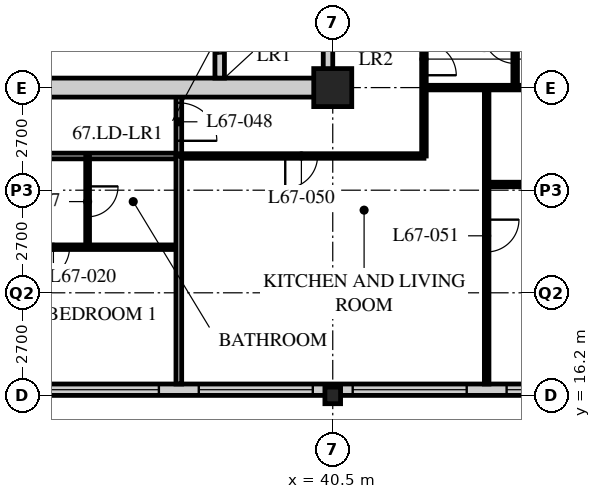
"""IFC4 building model, lengths in metres.
Left out: names, types, materials, properties, quantities, classifications, styles, units other than length and angle.
Written with IfcOpenShell. Run it as: python <this file> out.ifc"""

import sys

from ifc_helpers import new_model, si_unit, direction, frame, frame_2d, origin, origin_2d, place, context, subcontext, project, spatial, rectangle, hollow_rectangle, i_section, extrude, element, fill, save


model = new_model("IFC4")
c1 = context("Model", 3, precision=1e-05, world=origin(), true_north=direction((0.0, 1.0)))
c2 = subcontext(c1, "Body", "Model", "MODEL_VIEW")
j1 = project(units=[si_unit("LENGTHUNIT", "METRE"), si_unit("PLANEANGLEUNIT", "RADIAN")], contexts=[c1])
p1 = place(None, origin())
s1 = spatial("IfcSite", under=j1, at=p1, CompositionType="ELEMENT")
p2 = place(p1, origin())
s2 = spatial("IfcBuilding", under=s1, at=p2, CompositionType="ELEMENT")
p3 = place(p2, frame((0.0, 0.0, 261.9)))
s3 = spatial("IfcBuildingStorey", under=s2, at=p3, CompositionType="ELEMENT", Elevation=261.9)
p4 = place(p3, frame((40.5, 16.2, 0.0), z_axis=(0.0, 0.0, 1.0), x_axis=(1.0, 0.0, 0.0)))
e1 = element("IfcColumn", 1, at=p4, inside=s3, PredefinedType="COLUMN", context=c2, shape_type="SweptSolid", body=[
    extrude(i_section(OverallWidth=0.412, OverallDepth=0.437, WebThickness=0.036, FlangeThickness=0.058, FilletRadius=0.015, at=origin_2d()), origin(), (0.0, 0.0, 1.0), 3.9),
])
p5 = place(p3, frame((40.5, 24.3, 0.0), z_axis=(0.0, 0.0, 1.0), x_axis=(1.0, 0.0, 0.0)))
e2 = element("IfcColumn", 2, at=p5, inside=s3, PredefinedType="COLUMN", context=c2, shape_type="SweptSolid", body=[
    extrude(hollow_rectangle(XDim=1.0, YDim=1.0, WallThickness=0.1, at=origin_2d()), origin(), (0.0, 0.0, 1.0), 3.9),
])
p6 = place(p3, frame((8.4, 16.35, 0.0), z_axis=(0.0, 0.0, 1.0), x_axis=(1.0, 0.0, 0.0)))
e3 = element("IfcWall", 3, at=p6, inside=s3, PredefinedType="SOLIDWALL", context=c2, shape_type="SweptSolid", body=[
    extrude(rectangle(XDim=40.2, YDim=0.3, at=frame_2d((20.1, 0.0))), origin(), (0.0, 0.0, 1.0), 3.69),
])
p7 = place(p6, frame((0.225, 0.0, 0.6)))
e4 = element("IfcOpeningElement", 4, at=p7, cuts=e3, PredefinedType="OPENING", context=c2, shape_type="SweptSolid", body=[
    extrude(rectangle(XDim=3.0, YDim=2.4, at=frame_2d((1.5, 1.2))), frame((0.0, 0.16, 0.0), z_axis=(0.0, -1.0, 0.0), x_axis=(1.0, 0.0, 0.0)), (0.0, 0.0, 1.0), 0.32),
])
p8 = place(p6, frame((4.275, 0.0, 0.6)))
e5 = element("IfcOpeningElement", 5, at=p8, cuts=e3, PredefinedType="OPENING", context=c2, shape_type="SweptSolid", body=[
    extrude(rectangle(XDim=3.0, YDim=2.4, at=frame_2d((1.5, 1.2))), frame((0.0, 0.16, 0.0), z_axis=(0.0, -1.0, 0.0), x_axis=(1.0, 0.0, 0.0)), (0.0, 0.0, 1.0), 0.32),
])
p9 = place(p6, frame((8.325, 0.0, 0.6)))
e6 = element("IfcOpeningElement", 6, at=p9, cuts=e3, PredefinedType="OPENING", context=c2, shape_type="SweptSolid", body=[
    extrude(rectangle(XDim=3.0, YDim=2.4, at=frame_2d((1.5, 1.2))), frame((0.0, 0.16, 0.0), z_axis=(0.0, -1.0, 0.0), x_axis=(1.0, 0.0, 0.0)), (0.0, 0.0, 1.0), 0.32),
])
p10 = place(p6, frame((12.375, 0.0, 0.6)))
e7 = element("IfcOpeningElement", 7, at=p10, cuts=e3, PredefinedType="OPENING", context=c2, shape_type="SweptSolid", body=[
    extrude(rectangle(XDim=3.0, YDim=2.4, at=frame_2d((1.5, 1.2))), frame((0.0, 0.16, 0.0), z_axis=(0.0, -1.0, 0.0), x_axis=(1.0, 0.0, 0.0)), (0.0, 0.0, 1.0), 0.32),
])
p11 = place(p6, frame((16.425, 0.0, 0.6)))
e8 = element("IfcOpeningElement", 8, at=p11, cuts=e3, PredefinedType="OPENING", context=c2, shape_type="SweptSolid", body=[
    extrude(rectangle(XDim=3.0, YDim=2.4, at=frame_2d((1.5, 1.2))), frame((0.0, 0.16, 0.0), z_axis=(0.0, -1.0, 0.0), x_axis=(1.0, 0.0, 0.0)), (0.0, 0.0, 1.0), 0.32),
])
p12 = place(p6, frame((20.475, 0.0, 0.6)))
e9 = element("IfcOpeningElement", 9, at=p12, cuts=e3, PredefinedType="OPENING", context=c2, shape_type="SweptSolid", body=[
    extrude(rectangle(XDim=3.0, YDim=2.4, at=frame_2d((1.5, 1.2))), frame((0.0, 0.16, 0.0), z_axis=(0.0, -1.0, 0.0), x_axis=(1.0, 0.0, 0.0)), (0.0, 0.0, 1.0), 0.32),
])
p13 = place(p6, frame((24.525, 0.0, 0.6)))
e10 = element("IfcOpeningElement", 10, at=p13, cuts=e3, PredefinedType="OPENING", context=c2, shape_type="SweptSolid", body=[
    extrude(rectangle(XDim=3.0, YDim=2.4, at=frame_2d((1.5, 1.2))), frame((0.0, 0.16, 0.0), z_axis=(0.0, -1.0, 0.0), x_axis=(1.0, 0.0, 0.0)), (0.0, 0.0, 1.0), 0.32),
])
p14 = place(p6, frame((28.575, 0.0, 0.6)))
e11 = element("IfcOpeningElement", 11, at=p14, cuts=e3, PredefinedType="OPENING", context=c2, shape_type="SweptSolid", body=[
    extrude(rectangle(XDim=3.0, YDim=2.4, at=frame_2d((1.5, 1.2))), frame((0.0, 0.16, 0.0), z_axis=(0.0, -1.0, 0.0), x_axis=(1.0, 0.0, 0.0)), (0.0, 0.0, 1.0), 0.32),
])
p15 = place(p6, frame((32.625, 0.0, 0.6)))
e12 = element("IfcOpeningElement", 12, at=p15, cuts=e3, PredefinedType="OPENING", context=c2, shape_type="SweptSolid", body=[
    extrude(rectangle(XDim=3.0, YDim=2.4, at=frame_2d((1.5, 1.2))), frame((0.0, 0.16, 0.0), z_axis=(0.0, -1.0, 0.0), x_axis=(1.0, 0.0, 0.0)), (0.0, 0.0, 1.0), 0.32),
])
p16 = place(p6, frame((36.675, 0.0, 0.6)))
e13 = element("IfcOpeningElement", 13, at=p16, cuts=e3, PredefinedType="OPENING", context=c2, shape_type="SweptSolid", body=[
    extrude(rectangle(XDim=3.0, YDim=2.4, at=frame_2d((1.5, 1.2))), frame((0.0, 0.16, 0.0), z_axis=(0.0, -1.0, 0.0), x_axis=(1.0, 0.0, 0.0)), (0.0, 0.0, 1.0), 0.32),
])
p17 = place(p3, frame((8.1, 22.5, 0.0), z_axis=(0.0, 0.0, 1.0), x_axis=(1.0, 0.0, 0.0)))
e14 = element("IfcWall", 14, at=p17, inside=s3, PredefinedType="PARTITIONING", context=c2, shape_type="SweptSolid", body=[
    extrude(rectangle(XDim=28.35, YDim=0.15, at=frame_2d((14.175, 0.0))), origin(), (0.0, 0.0, 1.0), 3.69),
])
p18 = place(p17, frame((4.45, 0.0, 0.0)))
e15 = element("IfcOpeningElement", 15, at=p18, cuts=e14, PredefinedType="OPENING", context=c2, shape_type="SweptSolid", body=[
    extrude(rectangle(XDim=1.0, YDim=2.1, at=frame_2d((0.5, 1.05))), frame((0.0, 0.085, 0.0), z_axis=(0.0, -1.0, 0.0), x_axis=(1.0, 0.0, 0.0)), (0.0, 0.0, 1.0), 0.17),
])
p19 = place(p17, frame((12.55, 0.0, 0.0)))
e16 = element("IfcOpeningElement", 16, at=p19, cuts=e14, PredefinedType="OPENING", context=c2, shape_type="SweptSolid", body=[
    extrude(rectangle(XDim=1.0, YDim=2.1, at=frame_2d((0.5, 1.05))), frame((0.0, 0.085, 0.0), z_axis=(0.0, -1.0, 0.0), x_axis=(1.0, 0.0, 0.0)), (0.0, 0.0, 1.0), 0.17),
])
p20 = place(p17, frame((20.65, 0.0, 0.0)))
e17 = element("IfcOpeningElement", 17, at=p20, cuts=e14, PredefinedType="OPENING", context=c2, shape_type="SweptSolid", body=[
    extrude(rectangle(XDim=1.0, YDim=2.1, at=frame_2d((0.5, 1.05))), frame((0.0, 0.085, 0.0), z_axis=(0.0, -1.0, 0.0), x_axis=(1.0, 0.0, 0.0)), (0.0, 0.0, 1.0), 0.17),
])
p21 = place(p17, frame((2.625, 0.0, 0.0)))
e18 = element("IfcOpeningElement", 18, at=p21, cuts=e14, PredefinedType="OPENING", context=c2, shape_type="SweptSolid", body=[
    extrude(rectangle(XDim=1.0, YDim=2.1, at=frame_2d((0.5, 1.05))), frame((0.0, 0.085, 0.0), z_axis=(0.0, -1.0, 0.0), x_axis=(1.0, 0.0, 0.0)), (0.0, 0.0, 1.0), 0.17),
])
p22 = place(p3, frame((36.45, 22.5, 0.0), z_axis=(0.0, 0.0, 1.0), x_axis=(0.0, 1.0, 0.0)))
e19 = element("IfcWall", 19, at=p22, inside=s3, PredefinedType="PARTITIONING", context=c2, shape_type="SweptSolid", body=[
    extrude(rectangle(XDim=1.8, YDim=0.15, at=frame_2d((0.9, 0.0))), origin(), (0.0, 0.0, 1.0), 3.69),
])
p23 = place(p22, frame((0.4, 0.0, 0.0)))
e20 = element("IfcOpeningElement", 20, at=p23, cuts=e19, PredefinedType="OPENING", context=c2, shape_type="SweptSolid", body=[
    extrude(rectangle(XDim=1.0, YDim=2.1, at=frame_2d((0.5, 1.05))), frame((0.0, 0.085, 0.0), z_axis=(0.0, -1.0, 0.0), x_axis=(1.0, 0.0, 0.0)), (0.0, 0.0, 1.0), 0.17),
])
p24 = place(p3, frame((34.05, 22.5, 0.0), z_axis=(0.0, 0.0, 1.0), x_axis=(0.0, -1.0, 0.0)))
e21 = element("IfcWall", 21, at=p24, inside=s3, PredefinedType="PARTITIONING", context=c2, shape_type="SweptSolid", body=[
    extrude(rectangle(XDim=2.4, YDim=0.1, at=frame_2d((1.2, 0.0))), origin(), (0.0, 0.0, 1.0), 3.69),
])
p25 = place(p24, frame((0.8, 0.0, 0.0)))
e22 = element("IfcOpeningElement", 22, at=p25, cuts=e21, PredefinedType="OPENING", context=c2, shape_type="SweptSolid", body=[
    extrude(rectangle(XDim=0.8, YDim=2.1, at=frame_2d((0.4, 1.05))), frame((0.0, 0.06, 0.0), z_axis=(0.0, -1.0, 0.0), x_axis=(1.0, 0.0, 0.0)), (0.0, 0.0, 1.0), 0.12),
])
p26 = place(p3, frame((8.1, 20.1, 0.0), z_axis=(0.0, 0.0, 1.0), x_axis=(1.0, 0.0, 0.0)))
e23 = element("IfcWall", 23, at=p26, inside=s3, PredefinedType="PARTITIONING", context=c2, shape_type="SweptSolid", body=[
    extrude(rectangle(XDim=28.35, YDim=0.12, at=frame_2d((14.175, 0.0))), origin(), (0.0, 0.0, 1.0), 3.69),
])
p27 = place(p26, frame((5.025, 0.0, 0.0)))
e24 = element("IfcOpeningElement", 24, at=p27, cuts=e23, PredefinedType="OPENING", context=c2, shape_type="SweptSolid", body=[
    extrude(rectangle(XDim=0.85, YDim=2.1, at=frame_2d((0.425, 1.05))), frame((0.0, 0.07, 0.0), z_axis=(0.0, -1.0, 0.0), x_axis=(1.0, 0.0, 0.0)), (0.0, 0.0, 1.0), 0.14),
])
p28 = place(p26, frame((8.425, 0.0, 0.0)))
e25 = element("IfcOpeningElement", 25, at=p28, cuts=e23, PredefinedType="OPENING", context=c2, shape_type="SweptSolid", body=[
    extrude(rectangle(XDim=0.85, YDim=2.1, at=frame_2d((0.425, 1.05))), frame((0.0, 0.07, 0.0), z_axis=(0.0, -1.0, 0.0), x_axis=(1.0, 0.0, 0.0)), (0.0, 0.0, 1.0), 0.14),
])
p29 = place(p26, frame((13.125, 0.0, 0.0)))
e26 = element("IfcOpeningElement", 26, at=p29, cuts=e23, PredefinedType="OPENING", context=c2, shape_type="SweptSolid", body=[
    extrude(rectangle(XDim=0.85, YDim=2.1, at=frame_2d((0.425, 1.05))), frame((0.0, 0.07, 0.0), z_axis=(0.0, -1.0, 0.0), x_axis=(1.0, 0.0, 0.0)), (0.0, 0.0, 1.0), 0.14),
])
p30 = place(p26, frame((16.525, 0.0, 0.0)))
e27 = element("IfcOpeningElement", 27, at=p30, cuts=e23, PredefinedType="OPENING", context=c2, shape_type="SweptSolid", body=[
    extrude(rectangle(XDim=0.85, YDim=2.1, at=frame_2d((0.425, 1.05))), frame((0.0, 0.07, 0.0), z_axis=(0.0, -1.0, 0.0), x_axis=(1.0, 0.0, 0.0)), (0.0, 0.0, 1.0), 0.14),
])
p31 = place(p26, frame((21.225, 0.0, 0.0)))
e28 = element("IfcOpeningElement", 28, at=p31, cuts=e23, PredefinedType="OPENING", context=c2, shape_type="SweptSolid", body=[
    extrude(rectangle(XDim=0.85, YDim=2.1, at=frame_2d((0.425, 1.05))), frame((0.0, 0.07, 0.0), z_axis=(0.0, -1.0, 0.0), x_axis=(1.0, 0.0, 0.0)), (0.0, 0.0, 1.0), 0.14),
])
p32 = place(p26, frame((24.625, 0.0, 0.0)))
e29 = element("IfcOpeningElement", 29, at=p32, cuts=e23, PredefinedType="OPENING", context=c2, shape_type="SweptSolid", body=[
    extrude(rectangle(XDim=0.85, YDim=2.1, at=frame_2d((0.425, 1.05))), frame((0.0, 0.07, 0.0), z_axis=(0.0, -1.0, 0.0), x_axis=(1.0, 0.0, 0.0)), (0.0, 0.0, 1.0), 0.14),
])
p33 = place(p26, frame((2.725, 0.0, 0.0)))
e30 = element("IfcOpeningElement", 30, at=p33, cuts=e23, PredefinedType="OPENING", context=c2, shape_type="SweptSolid", body=[
    extrude(rectangle(XDim=0.85, YDim=2.1, at=frame_2d((0.425, 1.05))), frame((0.0, 0.07, 0.0), z_axis=(0.0, -1.0, 0.0), x_axis=(1.0, 0.0, 0.0)), (0.0, 0.0, 1.0), 0.14),
])
p34 = place(p3, frame((42.9, 22.5, 0.0), z_axis=(0.0, 0.0, 1.0), x_axis=(0.0, 1.0, 0.0)))
e31 = element("IfcWall", 31, at=p34, inside=s3, PredefinedType="PARTITIONING", context=c2, shape_type="SweptSolid", body=[
    extrude(rectangle(XDim=9.9, YDim=0.12, at=frame_2d((4.95, 0.0))), origin(), (0.0, 0.0, 1.0), 3.69),
])
p35 = place(p34, frame((2.125, 0.0, 0.0)))
e32 = element("IfcOpeningElement", 32, at=p35, cuts=e31, PredefinedType="OPENING", context=c2, shape_type="SweptSolid", body=[
    extrude(rectangle(XDim=0.85, YDim=2.1, at=frame_2d((0.425, 1.05))), frame((0.0, 0.07, 0.0), z_axis=(0.0, -1.0, 0.0), x_axis=(1.0, 0.0, 0.0)), (0.0, 0.0, 1.0), 0.14),
])
p36 = place(p34, frame((6.175, 0.0, 0.0)))
e33 = element("IfcOpeningElement", 33, at=p36, cuts=e31, PredefinedType="OPENING", context=c2, shape_type="SweptSolid", body=[
    extrude(rectangle(XDim=0.85, YDim=2.1, at=frame_2d((0.425, 1.05))), frame((0.0, 0.07, 0.0), z_axis=(0.0, -1.0, 0.0), x_axis=(1.0, 0.0, 0.0)), (0.0, 0.0, 1.0), 0.14),
])
p37 = place(p3, frame((36.45, 22.5, 0.0), z_axis=(0.0, 0.0, 1.0), x_axis=(1.0, 0.0, 0.0)))
e34 = element("IfcWall", 34, at=p37, inside=s3, PredefinedType="PARTITIONING", context=c2, shape_type="SweptSolid", body=[
    extrude(rectangle(XDim=6.45, YDim=0.12, at=frame_2d((3.225, 0.0))), origin(), (0.0, 0.0, 1.0), 3.69),
])
p38 = place(p37, frame((2.8, 0.0, 0.0)))
e35 = element("IfcOpeningElement", 35, at=p38, cuts=e34, PredefinedType="OPENING", context=c2, shape_type="SweptSolid", body=[
    extrude(rectangle(XDim=0.85, YDim=2.1, at=frame_2d((0.425, 1.05))), frame((0.0, 0.07, 0.0), z_axis=(0.0, -1.0, 0.0), x_axis=(1.0, 0.0, 0.0)), (0.0, 0.0, 1.0), 0.14),
])
p39 = place(p3, frame((42.9, 24.3, 0.0), z_axis=(0.0, 0.0, 1.0), x_axis=(1.0, 0.0, 0.0)))
e36 = element("IfcWall", 36, at=p39, inside=s3, PredefinedType="PARTITIONING", context=c2, shape_type="SweptSolid", body=[
    extrude(rectangle(XDim=9.45, YDim=0.12, at=frame_2d((4.725, 0.0))), origin(), (0.0, 0.0, 1.0), 3.078),
])
p40 = place(p3, frame((36.45, 16.5, 0.0), z_axis=(0.0, 0.0, 1.0), x_axis=(0.0, 1.0, 0.0)))
e37 = element("IfcWall", 37, at=p40, inside=s3, PredefinedType="PARTITIONING", context=c2, shape_type="SweptSolid", body=[
    extrude(rectangle(XDim=6.0, YDim=0.15, at=frame_2d((3.0, 0.0))), origin(), (0.0, 0.0, 1.0), 3.69),
])
p41 = place(p3, frame((44.55, 16.5, 0.0), z_axis=(0.0, 0.0, 1.0), x_axis=(0.0, 1.0, 0.0)))
e38 = element("IfcWall", 38, at=p41, inside=s3, PredefinedType="PARTITIONING", context=c2, shape_type="SweptSolid", body=[
    extrude(rectangle(XDim=7.8, YDim=0.12, at=frame_2d((3.9, 0.0))), origin(), (0.0, 0.0, 1.0), 3.69),
])
p42 = place(p41, frame((3.475, 0.0, 0.0)))
e39 = element("IfcOpeningElement", 39, at=p42, cuts=e38, PredefinedType="OPENING", context=c2, shape_type="SweptSolid", body=[
    extrude(rectangle(XDim=0.85, YDim=2.1, at=frame_2d((0.425, 1.05))), frame((0.0, 0.07, 0.0), z_axis=(0.0, -1.0, 0.0), x_axis=(1.0, 0.0, 0.0)), (0.0, 0.0, 1.0), 0.14),
])
p43 = place(p3, frame((45.3, 24.3, 0.0), z_axis=(0.0, 0.0, 1.0), x_axis=(0.0, 1.0, 0.0)))
e40 = element("IfcWall", 40, at=p43, inside=s3, PredefinedType="PARTITIONING", context=c2, shape_type="SweptSolid", body=[
    extrude(rectangle(XDim=1.76, YDim=0.12, at=frame_2d((0.88, 0.0))), origin(), (0.0, 0.0, 1.0), 3.69),
])
p44 = place(p43, frame((0.635, 0.0, 0.0)))
e41 = element("IfcOpeningElement", 41, at=p44, cuts=e40, PredefinedType="OPENING", context=c2, shape_type="SweptSolid", body=[
    extrude(rectangle(XDim=0.85, YDim=2.1, at=frame_2d((0.425, 1.05))), frame((0.0, 0.07, 0.0), z_axis=(0.0, -1.0, 0.0), x_axis=(1.0, 0.0, 0.0)), (0.0, 0.0, 1.0), 0.14),
])
p45 = place(p3, frame((44.55, 21.75, 0.0), z_axis=(0.0, 0.0, 1.0), x_axis=(1.0, 0.0, 0.0)))
e42 = element("IfcWall", 42, at=p45, inside=s3, PredefinedType="PARTITIONING", context=c2, shape_type="SweptSolid", body=[
    extrude(rectangle(XDim=7.8, YDim=0.12, at=frame_2d((3.9, 0.0))), origin(), (0.0, 0.0, 1.0), 3.69),
])
p46 = place(p45, frame((3.475, 0.0, 0.0)))
e43 = element("IfcOpeningElement", 43, at=p46, cuts=e42, PredefinedType="OPENING", context=c2, shape_type="SweptSolid", body=[
    extrude(rectangle(XDim=0.85, YDim=2.1, at=frame_2d((0.425, 1.05))), frame((0.0, 0.07, 0.0), z_axis=(0.0, -1.0, 0.0), x_axis=(1.0, 0.0, 0.0)), (0.0, 0.0, 1.0), 0.14),
])
p47 = place(p3, frame((15.95, 24.3, 0.0), z_axis=(0.0, 0.0, 1.0), x_axis=(1.0, 0.0, 0.0)))
e44 = element("IfcWall", 44, at=p47, inside=s3, PredefinedType="SOLIDWALL", context=c2, shape_type="SweptSolid", body=[
    extrude(rectangle(XDim=24.55, YDim=0.5, at=frame_2d((12.275, 0.0))), origin(), (0.0, 0.0, 1.0), 3.04),
])
p48 = place(p47, frame((11.5, 0.0, 0.0)))
e45 = element("IfcOpeningElement", 45, at=p48, cuts=e44, PredefinedType="OPENING", context=c2, shape_type="SweptSolid", body=[
    extrude(rectangle(XDim=1.8, YDim=2.4, at=frame_2d((0.9, 1.2))), frame((0.0, 0.26, 0.0), z_axis=(0.0, -1.0, 0.0), x_axis=(1.0, 0.0, 0.0)), (0.0, 0.0, 1.0), 0.52),
])
p49 = place(p3, frame((40.375, 24.55, 0.0), z_axis=(0.0, 0.0, 1.0), x_axis=(0.0, 1.0, 0.0)))
e46 = element("IfcWall", 46, at=p49, inside=s3, PredefinedType="SOLIDWALL", context=c2, shape_type="SweptSolid", body=[
    extrude(rectangle(XDim=15.7, YDim=0.25, at=frame_2d((7.85, 0.0))), origin(), (0.0, 0.0, 1.0), 3.078),
])
p50 = place(p3, frame((37.525, 24.55, 0.0), z_axis=(0.0, 0.0, 1.0), x_axis=(0.0, 1.0, 0.0)))
e47 = element("IfcWall", 47, at=p50, inside=s3, PredefinedType="SOLIDWALL", context=c2, shape_type="SweptSolid", body=[
    extrude(rectangle(XDim=7.75, YDim=0.25, at=frame_2d((3.875, 0.0))), origin(), (0.0, 0.0, 1.0), 3.69),
])
p51 = place(p50, frame((0.65, 0.0, 0.0)))
e48 = element("IfcOpeningElement", 48, at=p51, cuts=e47, PredefinedType="OPENING", context=c2, shape_type="SweptSolid", body=[
    extrude(rectangle(XDim=1.1, YDim=2.4, at=frame_2d((0.55, 1.2))), frame((0.0, 0.135, 0.0), z_axis=(0.0, -1.0, 0.0), x_axis=(1.0, 0.0, 0.0)), (0.0, 0.0, 1.0), 0.27),
])
p52 = place(p50, frame((3.25, 0.0, 0.0)))
e49 = element("IfcOpeningElement", 49, at=p52, cuts=e47, PredefinedType="OPENING", context=c2, shape_type="SweptSolid", body=[
    extrude(rectangle(XDim=1.1, YDim=2.4, at=frame_2d((0.55, 1.2))), frame((0.0, 0.135, 0.0), z_axis=(0.0, -1.0, 0.0), x_axis=(1.0, 0.0, 0.0)), (0.0, 0.0, 1.0), 0.27),
])
p53 = place(p50, frame((5.85, 0.0, 0.0)))
e50 = element("IfcOpeningElement", 50, at=p53, cuts=e47, PredefinedType="OPENING", context=c2, shape_type="SweptSolid", body=[
    extrude(rectangle(XDim=1.1, YDim=2.4, at=frame_2d((0.55, 1.2))), frame((0.0, 0.135, 0.0), z_axis=(0.0, -1.0, 0.0), x_axis=(1.0, 0.0, 0.0)), (0.0, 0.0, 1.0), 0.27),
])
p54 = place(p13, origin())
e51 = element("IfcWindow", 51, at=p54, inside=s3, PartitioningType="SINGLE_PANEL", PredefinedType="WINDOW", context=c2, shape_type="SweptSolid", body=[
    extrude(rectangle(XDim=3.0, YDim=2.4, at=frame_2d((1.5, 1.2))), frame((0.0, 0.03, 0.0), z_axis=(0.0, -1.0, 0.0), x_axis=(1.0, 0.0, 0.0)), (0.0, 0.0, 1.0), 0.06),
])
fill(e10, e51)
p55 = place(p14, origin())
e52 = element("IfcWindow", 52, at=p55, inside=s3, PartitioningType="SINGLE_PANEL", PredefinedType="WINDOW", context=c2, shape_type="SweptSolid", body=[
    extrude(rectangle(XDim=3.0, YDim=2.4, at=frame_2d((1.5, 1.2))), frame((0.0, 0.03, 0.0), z_axis=(0.0, -1.0, 0.0), x_axis=(1.0, 0.0, 0.0)), (0.0, 0.0, 1.0), 0.06),
])
fill(e11, e52)
p56 = place(p15, origin())
e53 = element("IfcWindow", 53, at=p56, inside=s3, PartitioningType="SINGLE_PANEL", PredefinedType="WINDOW", context=c2, shape_type="SweptSolid", body=[
    extrude(rectangle(XDim=3.0, YDim=2.4, at=frame_2d((1.5, 1.2))), frame((0.0, 0.03, 0.0), z_axis=(0.0, -1.0, 0.0), x_axis=(1.0, 0.0, 0.0)), (0.0, 0.0, 1.0), 0.06),
])
fill(e12, e53)
p57 = place(p16, origin())
e54 = element("IfcWindow", 54, at=p57, inside=s3, PartitioningType="SINGLE_PANEL", PredefinedType="WINDOW", context=c2, shape_type="SweptSolid", body=[
    extrude(rectangle(XDim=3.0, YDim=2.4, at=frame_2d((1.5, 1.2))), frame((0.0, 0.03, 0.0), z_axis=(0.0, -1.0, 0.0), x_axis=(1.0, 0.0, 0.0)), (0.0, 0.0, 1.0), 0.06),
])
fill(e13, e54)
p58 = place(p25, origin())
e55 = element("IfcDoor", 55, at=p58, inside=s3, OperationType="SINGLE_SWING_LEFT", PredefinedType="DOOR", context=c2, shape_type="SweptSolid", body=[
    extrude(rectangle(XDim=0.8, YDim=2.1, at=frame_2d((0.4, 1.05))), frame((0.0, 0.025, 0.0), z_axis=(0.0, -1.0, 0.0), x_axis=(1.0, 0.0, 0.0)), (0.0, 0.0, 1.0), 0.05),
])
fill(e22, e55)
p59 = place(p32, origin())
e56 = element("IfcDoor", 56, at=p59, inside=s3, OperationType="SINGLE_SWING_RIGHT", PredefinedType="DOOR", context=c2, shape_type="SweptSolid", body=[
    extrude(rectangle(XDim=0.85, YDim=2.1, at=frame_2d((0.425, 1.05))), frame((0.0, 0.025, 0.0), z_axis=(0.0, -1.0, 0.0), x_axis=(1.0, 0.0, 0.0)), (0.0, 0.0, 1.0), 0.05),
])
fill(e29, e56)
p60 = place(p23, origin())
e57 = element("IfcDoor", 57, at=p60, inside=s3, OperationType="SINGLE_SWING_RIGHT", PredefinedType="DOOR", context=c2, shape_type="SweptSolid", body=[
    extrude(rectangle(XDim=1.0, YDim=2.1, at=frame_2d((0.5, 1.05))), frame((0.0, 0.025, 0.0), z_axis=(0.0, -1.0, 0.0), x_axis=(1.0, 0.0, 0.0)), (0.0, 0.0, 1.0), 0.05),
])
fill(e20, e57)
p61 = place(p38, origin())
e58 = element("IfcDoor", 58, at=p61, inside=s3, OperationType="SINGLE_SWING_RIGHT", PredefinedType="DOOR", context=c2, shape_type="SweptSolid", body=[
    extrude(rectangle(XDim=0.85, YDim=2.1, at=frame_2d((0.425, 1.05))), frame((0.0, 0.025, 0.0), z_axis=(0.0, -1.0, 0.0), x_axis=(1.0, 0.0, 0.0)), (0.0, 0.0, 1.0), 0.05),
])
fill(e35, e58)
p62 = place(p42, origin())
e59 = element("IfcDoor", 59, at=p62, inside=s3, OperationType="SINGLE_SWING_LEFT", PredefinedType="DOOR", context=c2, shape_type="SweptSolid", body=[
    extrude(rectangle(XDim=0.85, YDim=2.1, at=frame_2d((0.425, 1.05))), frame((0.0, 0.025, 0.0), z_axis=(0.0, -1.0, 0.0), x_axis=(1.0, 0.0, 0.0)), (0.0, 0.0, 1.0), 0.05),
])
fill(e39, e59)
p63 = place(p35, origin())
e60 = element("IfcDoor", 60, at=p63, inside=s3, OperationType="SINGLE_SWING_RIGHT", PredefinedType="DOOR", context=c2, shape_type="SweptSolid", body=[
    extrude(rectangle(XDim=0.85, YDim=2.1, at=frame_2d((0.425, 1.05))), frame((0.0, 0.025, 0.0), z_axis=(0.0, -1.0, 0.0), x_axis=(1.0, 0.0, 0.0)), (0.0, 0.0, 1.0), 0.05),
])
fill(e32, e60)
p64 = place(p44, origin())
e61 = element("IfcDoor", 61, at=p64, inside=s3, OperationType="SINGLE_SWING_RIGHT", PredefinedType="DOOR", context=c2, shape_type="SweptSolid", body=[
    extrude(rectangle(XDim=0.85, YDim=2.1, at=frame_2d((0.425, 1.05))), frame((0.0, 0.025, 0.0), z_axis=(0.0, -1.0, 0.0), x_axis=(1.0, 0.0, 0.0)), (0.0, 0.0, 1.0), 0.05),
])
fill(e41, e61)
p65 = place(p51, origin())
e62 = element("IfcDoor", 62, at=p65, inside=s3, OperationType="DOUBLE_DOOR_SLIDING", PredefinedType="DOOR", context=c2, shape_type="SweptSolid", body=[
    extrude(rectangle(XDim=1.1, YDim=2.4, at=frame_2d((0.55, 1.2))), frame((0.0, 0.025, 0.0), z_axis=(0.0, -1.0, 0.0), x_axis=(1.0, 0.0, 0.0)), (0.0, 0.0, 1.0), 0.05),
])
fill(e48, e62)
save(model, sys.argv[1])
